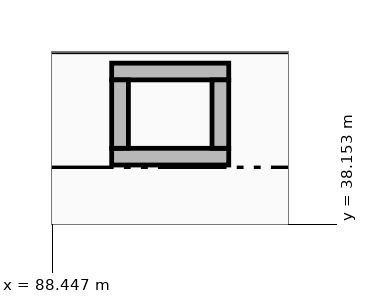
"""IFC4 building model, lengths in metres.
Left out: names, types, materials, properties, quantities, classifications, styles, units other than length and angle.
Written with IfcOpenShell. Run it as: python <this file> out.ifc"""

import sys

from ifc_helpers import new_model, si_unit, direction, frame, frame_2d, origin, place, context, subcontext, project, spatial, rectangle, extrude, element, save


model = new_model("IFC4")
c1 = context("Model", 3, precision=1e-05, world=origin(), true_north=direction((0.0, 1.0)))
c2 = subcontext(c1, "Body", "Model", "MODEL_VIEW")
j1 = project(units=[si_unit("LENGTHUNIT", "METRE"), si_unit("PLANEANGLEUNIT", "RADIAN")], contexts=[c1])
p1 = place(None, origin())
s1 = spatial("IfcSite", under=j1, at=p1, CompositionType="ELEMENT")
p2 = place(p1, origin())
s2 = spatial("IfcBuilding", under=s1, at=p2, CompositionType="ELEMENT")
p3 = place(p2, frame((0.0, 0.0, 4.5)))
s3 = spatial("IfcBuildingStorey", under=s2, at=p3, CompositionType="ELEMENT", Elevation=4.5)
for number, where, z_axis, x_axis in (
    (1, (89.23, 39.04, 0.0), (0.0, 0.0, 1.0), (1.0, 0.0, 0.0)),
    (2, (89.23, 40.16, 0.0), (0.0, 0.0, 1.0), (1.0, 0.0, 0.0)),
):
    element("IfcWall", number, at=place(p3, frame(where, z_axis=z_axis, x_axis=x_axis)), inside=s3, PredefinedType="STANDARD", context=c2, shape_type="SweptSolid", body=[
        extrude(rectangle(XDim=1.54, YDim=0.22, at=frame_2d((0.77, 0.0))), origin(), (0.0, 0.0, 1.0), 3.26),
    ])
for number, where, z_axis, x_axis in (
    (3, (89.34, 39.15, 0.0), (0.0, 0.0, 1.0), (0.0, 1.0, 0.0)),
    (4, (90.66, 39.15, 0.0), (0.0, 0.0, 1.0), (0.0, 1.0, 0.0)),
):
    element("IfcWall", number, at=place(p3, frame(where, z_axis=z_axis, x_axis=x_axis)), inside=s3, PredefinedType="STANDARD", context=c2, shape_type="SweptSolid", body=[
        extrude(rectangle(XDim=0.9, YDim=0.22, at=frame_2d((0.45, 0.0))), origin(), (0.0, 0.0, 1.0), 3.26),
    ])
save(model, sys.argv[1])
